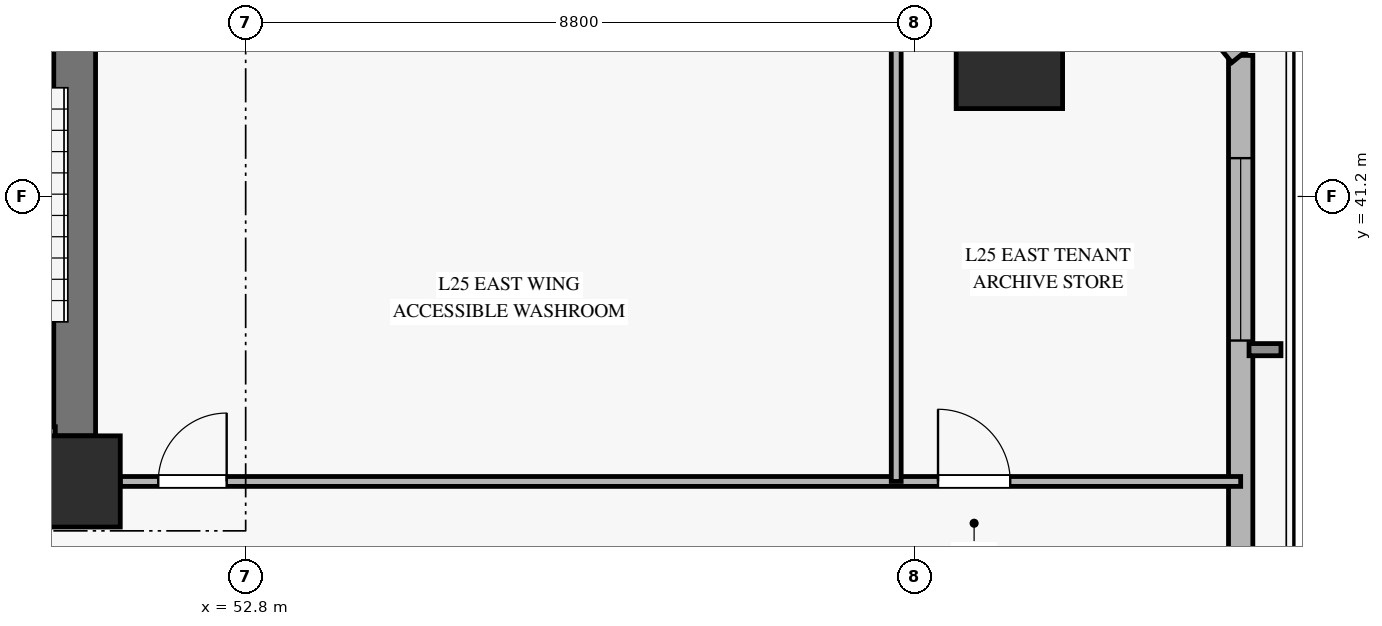
"""IFC4 building model, lengths in metres.
Left out: names, types, materials, properties, quantities, classifications, styles, units other than length and angle.
Written with IfcOpenShell. Run it as: python <this file> out.ifc"""

import sys

from ifc_helpers import new_model, si_unit, direction, frame, frame_2d, origin, origin_2d, place, context, subcontext, project, spatial, rectangle, hollow_rectangle, extrude, source, transform, mapped, element, fill, save


model = new_model("IFC4")
c1 = context("Model", 3, precision=1e-05, world=origin(), true_north=direction((0.0, 1.0)))
c2 = subcontext(c1, "Body", "Model", "MODEL_VIEW")
j1 = project(units=[si_unit("LENGTHUNIT", "METRE"), si_unit("PLANEANGLEUNIT", "RADIAN")], contexts=[c1])
p1 = place(None, origin())
s1 = spatial("IfcSite", under=j1, at=p1, CompositionType="ELEMENT")
p2 = place(p1, origin())
s2 = spatial("IfcBuilding", under=s1, at=p2, CompositionType="ELEMENT")
p3 = place(p2, frame((0.0, 0.0, 103.6)))
s3 = spatial("IfcBuildingStorey", under=s2, at=p3, CompositionType="ELEMENT", Elevation=103.6)
m1 = source(origin(), c2, "Body", "SweptSolid", [
    extrude(rectangle(XDim=1.2, YDim=1.2, at=origin_2d()), origin(), (0.0, 0.0, 1.0), 3.68),
])
p4 = place(p3, frame((50.55, 37.45, 0.0), z_axis=(0.0, 0.0, 1.0), x_axis=(1.0, 0.0, 0.0)))
e1 = element("IfcColumn", 1, at=p4, inside=s3, PredefinedType="PILASTER", context=c2, shape_type="MappedRepresentation", body=[
    mapped(m1, transform((0.0, 0.0, 0.0), x_axis=(1.0, 0.0, 0.0), y_axis=(0.0, 1.0, 0.0), z_axis=(0.0, 0.0, 1.0), scale=1.0)),
])
p5 = place(p3, frame((50.55, 38.05, 0.0), z_axis=(0.0, 0.0, 1.0), x_axis=(0.0, 1.0, 0.0)))
e2 = element("IfcWall", 2, at=p5, inside=s3, PredefinedType="SHEAR", context=c2, shape_type="SweptSolid", body=[
    extrude(rectangle(XDim=7.9, YDim=0.55, at=frame_2d((3.95, 0.0))), origin(), (0.0, 0.0, 1.0), 3.68),
])
m2 = source(origin(), c2, "Body", "SweptSolid", [
    extrude(hollow_rectangle(XDim=1.4, YDim=1.4, WallThickness=0.065, at=origin_2d()), origin(), (0.0, 0.0, 1.0), 3.68),
])
p6 = place(p3, frame((62.848, 43.056, 0.0), z_axis=(0.0, 0.0, 1.0), x_axis=(1.0, 0.0, 0.0)))
e3 = element("IfcColumn", 3, at=p6, inside=s3, PredefinedType="COLUMN", context=c2, shape_type="MappedRepresentation", body=[
    mapped(m2, transform((0.0, 0.0, 0.0), x_axis=(1.0, 0.0, 0.0), y_axis=(0.0, 1.0, 0.0), z_axis=(0.0, 0.0, 1.0), scale=1.0)),
])
p7 = place(p3, frame((65.891, 26.73, 0.0), z_axis=(0.0, 0.0, 1.0), x_axis=(0.0, 1.0, 0.0)))
e4 = element("IfcWall", 4, at=p7, inside=s3, PredefinedType="SOLIDWALL", context=c2, shape_type="SweptSolid", body=[
    extrude(rectangle(XDim=16.326, YDim=0.32, at=frame_2d((8.163, 0.0))), origin(), (0.0, 0.0, 1.0), 3.16),
])
p8 = place(p7, frame((1.26, 0.0, 0.45)))
e5 = element("IfcOpeningElement", 5, at=p8, cuts=e4, PredefinedType="OPENING", context=c2, shape_type="SweptSolid", body=[
    extrude(rectangle(XDim=2.4, YDim=2.1, at=frame_2d((1.2, 1.05))), frame((0.0, 0.17, 0.0), z_axis=(0.0, -1.0, 0.0), x_axis=(1.0, 0.0, 0.0)), (0.0, 0.0, 1.0), 0.34),
])
p9 = place(p7, frame((12.574, 0.0, 0.45)))
e6 = element("IfcOpeningElement", 6, at=p9, cuts=e4, PredefinedType="OPENING", context=c2, shape_type="SweptSolid", body=[
    extrude(rectangle(XDim=2.4, YDim=2.1, at=frame_2d((1.2, 1.05))), frame((0.0, 0.17, 0.0), z_axis=(0.0, -1.0, 0.0), x_axis=(1.0, 0.0, 0.0)), (0.0, 0.0, 1.0), 0.34),
])
p10 = place(p3, frame((65.891, 43.056, 0.0), z_axis=(0.0, 0.0, 1.0), x_axis=(-0.630273101398, 0.776373503962, 0.0)))
e7 = element("IfcWall", 7, at=p10, inside=s3, PredefinedType="SOLIDWALL", context=c2, shape_type="SweptSolid", body=[
    extrude(rectangle(XDim=4.114, YDim=0.3, at=frame_2d((2.057, 0.0))), origin(), (0.0, 0.0, 1.0), 3.16),
])
p11 = place(p10, frame((1.257, 0.0, 0.45)))
e8 = element("IfcOpeningElement", 8, at=p11, cuts=e7, PredefinedType="OPENING", context=c2, shape_type="SweptSolid", body=[
    extrude(rectangle(XDim=1.6, YDim=2.0, at=frame_2d((0.8, 1.0))), frame((0.0, 0.16, 0.0), z_axis=(0.0, -1.0, 0.0), x_axis=(1.0, 0.0, 0.0)), (0.0, 0.0, 1.0), 0.32),
])
p12 = place(p3, frame((47.44, 38.07, 0.0), z_axis=(0.0, 0.0, 1.0), x_axis=(1.0, 0.0, 0.0)))
e9 = element("IfcWall", 9, at=p12, inside=s3, PredefinedType="SOLIDWALL", context=c2, shape_type="SweptSolid", body=[
    extrude(rectangle(XDim=2.855, YDim=0.2, at=frame_2d((1.427, 0.0))), origin(), (0.0, 0.0, 1.0), 3.9),
])
p13 = place(p3, frame((51.15, 37.45, 0.0), z_axis=(0.0, 0.0, 1.0), x_axis=(1.0, 0.0, 0.0)))
e10 = element("IfcWall", 10, at=p13, inside=s3, PredefinedType="PARTITIONING", context=c2, shape_type="SweptSolid", body=[
    extrude(rectangle(XDim=14.741, YDim=0.13, at=frame_2d((7.371, 0.0))), origin(), (0.0, 0.0, 1.0), 3.165),
])
p14 = place(p13, frame((0.5, 0.0, 0.0)))
e11 = element("IfcOpeningElement", 11, at=p14, cuts=e10, PredefinedType="OPENING", context=c2, shape_type="SweptSolid", body=[
    extrude(rectangle(XDim=0.9, YDim=2.1, at=frame_2d((0.45, 1.05))), frame((0.0, 0.075, 0.0), z_axis=(0.0, -1.0, 0.0), x_axis=(1.0, 0.0, 0.0)), (0.0, 0.0, 1.0), 0.15),
])
p15 = place(p13, frame((10.759, 0.0, 0.0)))
e12 = element("IfcOpeningElement", 12, at=p15, cuts=e10, PredefinedType="OPENING", context=c2, shape_type="SweptSolid", body=[
    extrude(rectangle(XDim=0.95, YDim=2.1, at=frame_2d((0.475, 1.05))), frame((0.0, 0.075, 0.0), z_axis=(0.0, -1.0, 0.0), x_axis=(1.0, 0.0, 0.0)), (0.0, 0.0, 1.0), 0.15),
])
p16 = place(p3, frame((61.359, 37.45, 0.0), z_axis=(0.0, 0.0, 1.0), x_axis=(0.0, 1.0, 0.0)))
e13 = element("IfcWall", 13, at=p16, inside=s3, PredefinedType="PARTITIONING", context=c2, shape_type="SweptSolid", body=[
    extrude(rectangle(XDim=8.8, YDim=0.13, at=frame_2d((4.4, 0.0))), origin(), (0.0, 0.0, 1.0), 3.68),
])
m3 = source(origin(), c2, "Body", "SweptSolid", [
    extrude(rectangle(XDim=2.4, YDim=2.1, at=frame_2d((1.2, 1.05))), frame((0.0, 0.03, 0.0), z_axis=(0.0, -1.0, 0.0), x_axis=(1.0, 0.0, 0.0)), (0.0, 0.0, 1.0), 0.06),
])
p17 = place(p9, origin())
e14 = element("IfcWindow", 14, at=p17, inside=s3, PartitioningType="SINGLE_PANEL", PredefinedType="WINDOW", context=c2, shape_type="MappedRepresentation", body=[
    mapped(m3, transform((0.0, 0.0, 0.0), x_axis=(1.0, 0.0, 0.0), y_axis=(0.0, 1.0, 0.0), z_axis=(0.0, 0.0, 1.0), scale=1.0)),
])
fill(e6, e14)
m4 = source(origin(), c2, "Body", "SweptSolid", [
    extrude(rectangle(XDim=0.9, YDim=2.1, at=frame_2d((0.45, 1.05))), frame((0.0, 0.025, 0.0), z_axis=(0.0, -1.0, 0.0), x_axis=(1.0, 0.0, 0.0)), (0.0, 0.0, 1.0), 0.05),
])
p18 = place(p14, origin())
e15 = element("IfcDoor", 15, at=p18, inside=s3, OperationType="SINGLE_SWING_RIGHT", PredefinedType="DOOR", context=c2, shape_type="MappedRepresentation", body=[
    mapped(m4, transform((0.0, 0.0, 0.0), x_axis=(1.0, 0.0, 0.0), y_axis=(0.0, 1.0, 0.0), z_axis=(0.0, 0.0, 1.0), scale=1.0)),
])
fill(e11, e15)
m5 = source(origin(), c2, "Body", "SweptSolid", [
    extrude(rectangle(XDim=0.95, YDim=2.1, at=frame_2d((0.475, 1.05))), frame((0.0, 0.025, 0.0), z_axis=(0.0, -1.0, 0.0), x_axis=(1.0, 0.0, 0.0)), (0.0, 0.0, 1.0), 0.05),
])
p19 = place(p15, origin())
e16 = element("IfcDoor", 16, at=p19, inside=s3, OperationType="SINGLE_SWING_LEFT", PredefinedType="DOOR", context=c2, shape_type="MappedRepresentation", body=[
    mapped(m5, transform((0.0, 0.0, 0.0), x_axis=(1.0, 0.0, 0.0), y_axis=(0.0, 1.0, 0.0), z_axis=(0.0, 0.0, 1.0), scale=1.0)),
])
fill(e12, e16)
save(model, sys.argv[1])
